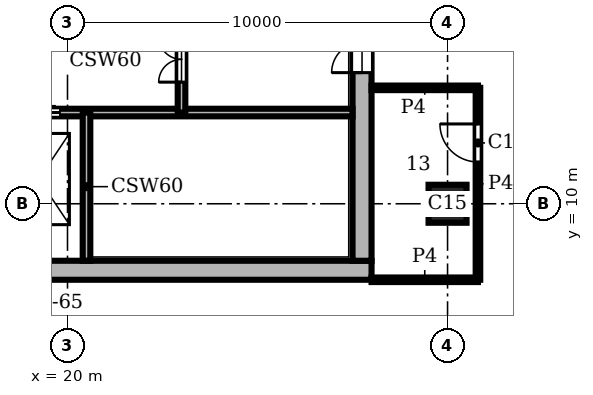
"""IFC4 building model, lengths in metres.
Left out: names, types, materials, properties, quantities, classifications, styles, units other than length and angle.
Written with IfcOpenShell. Run it as: python <this file> out.ifc"""

import sys

from ifc_helpers import new_model, si_unit, direction, frame, frame_2d, origin, origin_2d, place, context, subcontext, project, spatial, rectangle, extrude, element, fill, save


model = new_model("IFC4")
c1 = context("Model", 3, precision=1e-05, world=origin(), true_north=direction((0.0, 1.0)))
c2 = subcontext(c1, "Body", "Model", "MODEL_VIEW")
j1 = project(units=[si_unit("LENGTHUNIT", "METRE"), si_unit("PLANEANGLEUNIT", "RADIAN")], contexts=[c1])
p1 = place(None, origin())
s1 = spatial("IfcSite", under=j1, at=p1, CompositionType="ELEMENT")
p2 = place(p1, origin())
s2 = spatial("IfcBuilding", under=s1, at=p2, CompositionType="ELEMENT")
p3 = place(p2, frame((0.0, 0.0, 348.9)))
s3 = spatial("IfcBuildingStorey", under=s2, at=p3, CompositionType="ELEMENT", Elevation=348.9)
p4 = place(p3, frame((30.0, 10.0, 0.0), z_axis=(0.0, 0.0, 1.0), x_axis=(1.0, 0.0, 0.0)))
e1 = element("IfcColumn", 1, at=p4, inside=s3, PredefinedType="COLUMN", context=c2, shape_type="SweptSolid", body=[
    extrude(rectangle(XDim=1.0, YDim=1.0, at=origin_2d()), origin(), (0.0, 0.0, 1.0), 3.9),
])
p5 = place(p3, frame((8.0, 8.25, 0.0), z_axis=(0.0, 0.0, 1.0), x_axis=(1.0, 0.0, 0.0)))
e2 = element("IfcWall", 2, at=p5, inside=s3, PredefinedType="SHEAR", context=c2, shape_type="SweptSolid", body=[
    extrude(rectangle(XDim=20.0, YDim=0.5, at=frame_2d((10.0, 0.0))), origin(), (0.0, 0.0, 1.0), 3.9),
])
p6 = place(p3, frame((27.75, 8.5, 0.0), z_axis=(0.0, 0.0, 1.0), x_axis=(0.0, 1.0, 0.0)))
e3 = element("IfcWall", 3, at=p6, inside=s3, PredefinedType="SHEAR", context=c2, shape_type="SweptSolid", body=[
    extrude(rectangle(XDim=19.0, YDim=0.5, at=frame_2d((9.5, 0.0))), origin(), (0.0, 0.0, 1.0), 3.9),
])
p7 = place(p6, frame((4.95, 0.0, 0.0)))
e4 = element("IfcOpeningElement", 4, at=p7, cuts=e3, PredefinedType="OPENING", context=c2, shape_type="SweptSolid", body=[
    extrude(rectangle(XDim=1.6, YDim=2.1, at=frame_2d((0.8, 1.05))), frame((0.0, 0.26, 0.0), z_axis=(0.0, -1.0, 0.0), x_axis=(1.0, 0.0, 0.0)), (0.0, 0.0, 1.0), 0.52),
])
p8 = place(p3, frame((13.8, 12.4, 0.0), z_axis=(0.0, 0.0, 1.0), x_axis=(1.0, 0.0, 0.0)))
e5 = element("IfcWall", 5, at=p8, inside=s3, PredefinedType="SHEAR", context=c2, shape_type="SweptSolid", body=[
    extrude(rectangle(XDim=13.7, YDim=0.2, at=frame_2d((6.85, 0.0))), origin(), (0.0, 0.0, 1.0), 3.45),
])
p9 = place(p8, frame((2.4, 0.0, 0.0)))
e6 = element("IfcOpeningElement", 6, at=p9, cuts=e5, PredefinedType="OPENING", context=c2, shape_type="SweptSolid", body=[
    extrude(rectangle(XDim=1.1, YDim=2.1, at=frame_2d((0.55, 1.05))), frame((0.0, 0.11, 0.0), z_axis=(0.0, -1.0, 0.0), x_axis=(1.0, 0.0, 0.0)), (0.0, 0.0, 1.0), 0.22),
])
p10 = place(p8, frame((4.9, 0.0, 0.0)))
e7 = element("IfcOpeningElement", 7, at=p10, cuts=e5, PredefinedType="OPENING", context=c2, shape_type="SweptSolid", body=[
    extrude(rectangle(XDim=1.1, YDim=2.1, at=frame_2d((0.55, 1.05))), frame((0.0, 0.11, 0.0), z_axis=(0.0, -1.0, 0.0), x_axis=(1.0, 0.0, 0.0)), (0.0, 0.0, 1.0), 0.22),
])
p11 = place(p8, frame((0.15, 0.0, 0.0)))
e8 = element("IfcOpeningElement", 8, at=p11, cuts=e5, PredefinedType="OPENING", context=c2, shape_type="SweptSolid", body=[
    extrude(rectangle(XDim=1.0, YDim=2.1, at=frame_2d((0.5, 1.05))), frame((0.0, 0.11, 0.0), z_axis=(0.0, -1.0, 0.0), x_axis=(1.0, 0.0, 0.0)), (0.0, 0.0, 1.0), 0.22),
])
p12 = place(p3, frame((20.5, 8.5, 0.0), z_axis=(0.0, 0.0, 1.0), x_axis=(0.0, 1.0, 0.0)))
e9 = element("IfcWall", 9, at=p12, inside=s3, PredefinedType="SHEAR", context=c2, shape_type="SweptSolid", body=[
    extrude(rectangle(XDim=3.9, YDim=0.2, at=frame_2d((1.95, 0.0))), origin(), (0.0, 0.0, 1.0), 3.45),
])
p13 = place(p3, frame((23.0, 12.4, 0.0), z_axis=(0.0, 0.0, 1.0), x_axis=(0.0, 1.0, 0.0)))
e10 = element("IfcWall", 10, at=p13, inside=s3, PredefinedType="SHEAR", context=c2, shape_type="SweptSolid", body=[
    extrude(rectangle(XDim=2.8, YDim=0.2, at=frame_2d((1.4, 0.0))), origin(), (0.0, 0.0, 1.0), 3.45),
])
p14 = place(p13, frame((0.8, 0.0, 0.0)))
e11 = element("IfcOpeningElement", 11, at=p14, cuts=e10, PredefinedType="OPENING", context=c2, shape_type="SweptSolid", body=[
    extrude(rectangle(XDim=1.2, YDim=2.1, at=frame_2d((0.6, 1.05))), frame((0.0, 0.11, 0.0), z_axis=(0.0, -1.0, 0.0), x_axis=(1.0, 0.0, 0.0)), (0.0, 0.0, 1.0), 0.22),
])
p15 = place(p3, frame((30.8, 8.0, 0.0), z_axis=(0.0, 0.0, 1.0), x_axis=(0.0, 1.0, 0.0)))
e12 = element("IfcWall", 12, at=p15, inside=s3, PredefinedType="PARTITIONING", context=c2, shape_type="SweptSolid", body=[
    extrude(rectangle(XDim=5.05, YDim=0.12, at=frame_2d((2.525, 0.0))), origin(), (0.0, 0.0, 1.0), 3.45),
])
p16 = place(p15, frame((3.1, 0.0, 0.0)))
e13 = element("IfcOpeningElement", 13, at=p16, cuts=e12, PredefinedType="OPENING", context=c2, shape_type="SweptSolid", body=[
    extrude(rectangle(XDim=1.0, YDim=2.1, at=frame_2d((0.5, 1.05))), frame((0.0, 0.07, 0.0), z_axis=(0.0, -1.0, 0.0), x_axis=(1.0, 0.0, 0.0)), (0.0, 0.0, 1.0), 0.14),
])
for number, where, z_axis, x_axis in (
    (14, (28.0, 8.0, 0.0), (0.0, 0.0, 1.0), (1.0, 0.0, 0.0)),
    (15, (28.0, 13.05, 0.0), (0.0, 0.0, 1.0), (1.0, 0.0, 0.0)),
):
    element("IfcWall", number, at=place(p3, frame(where, z_axis=z_axis, x_axis=x_axis)), inside=s3, PredefinedType="PARTITIONING", context=c2, shape_type="SweptSolid", body=[
        extrude(rectangle(XDim=2.8, YDim=0.12, at=frame_2d((1.4, 0.0))), origin(), (0.0, 0.0, 1.0), 3.45),
    ])
p17 = place(p10, origin())
e16 = element("IfcDoor", 16, at=p17, inside=s3, OperationType="DOUBLE_DOOR_SLIDING", PredefinedType="DOOR", context=c2, shape_type="SweptSolid", body=[
    extrude(rectangle(XDim=1.1, YDim=2.1, at=frame_2d((0.55, 1.05))), frame((0.0, 0.025, 0.0), z_axis=(0.0, -1.0, 0.0), x_axis=(1.0, 0.0, 0.0)), (0.0, 0.0, 1.0), 0.05),
])
fill(e7, e16)
p18 = place(p14, origin())
e17 = element("IfcDoor", 17, at=p18, inside=s3, OperationType="DOUBLE_DOOR_SINGLE_SWING", PredefinedType="DOOR", context=c2, shape_type="SweptSolid", body=[
    extrude(rectangle(XDim=1.2, YDim=2.1, at=frame_2d((0.6, 1.05))), frame((0.0, 0.025, 0.0), z_axis=(0.0, -1.0, 0.0), x_axis=(1.0, 0.0, 0.0)), (0.0, 0.0, 1.0), 0.05),
])
fill(e11, e17)
p19 = place(p7, origin())
e18 = element("IfcDoor", 18, at=p19, inside=s3, OperationType="DOUBLE_DOOR_SINGLE_SWING", PredefinedType="DOOR", context=c2, shape_type="SweptSolid", body=[
    extrude(rectangle(XDim=1.6, YDim=2.1, at=frame_2d((0.8, 1.05))), frame((0.0, 0.025, 0.0), z_axis=(0.0, -1.0, 0.0), x_axis=(1.0, 0.0, 0.0)), (0.0, 0.0, 1.0), 0.05),
])
fill(e4, e18)
p20 = place(p16, origin())
e19 = element("IfcDoor", 19, at=p20, inside=s3, OperationType="SINGLE_SWING_RIGHT", PredefinedType="DOOR", context=c2, shape_type="SweptSolid", body=[
    extrude(rectangle(XDim=1.0, YDim=2.1, at=frame_2d((0.5, 1.05))), frame((0.0, 0.025, 0.0), z_axis=(0.0, -1.0, 0.0), x_axis=(1.0, 0.0, 0.0)), (0.0, 0.0, 1.0), 0.05),
])
fill(e13, e19)
save(model, sys.argv[1])
